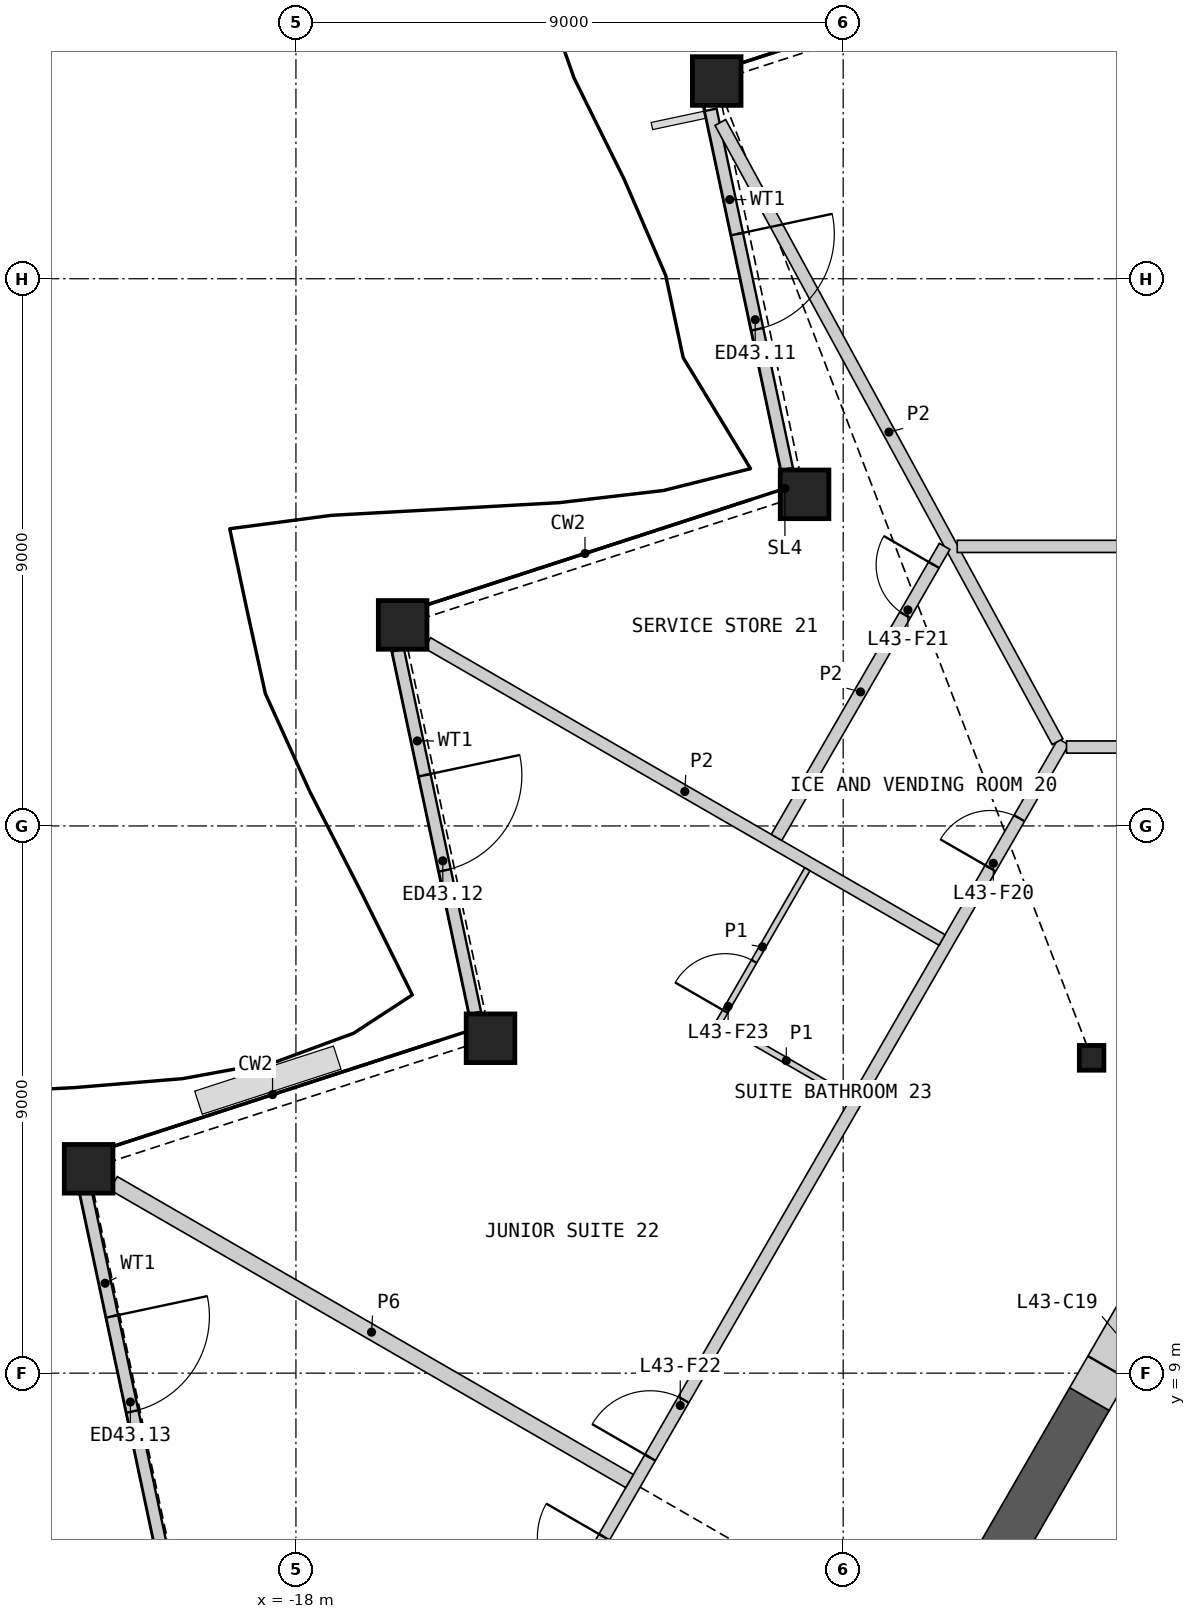
"""IFC4 building model, lengths in metres.
Left out: names, types, materials, properties, quantities, classifications, styles, units other than length and angle.
Written with IfcOpenShell. Run it as: python <this file> out.ifc"""

import sys

from ifc_helpers import new_model, si_unit, direction, frame, frame_2d, origin, origin_2d, place, context, subcontext, project, spatial, polyline, rectangle, hollow_rectangle, i_section, outline, extrude, element, fill, save


model = new_model("IFC4")
c1 = context("Model", 3, precision=1e-05, world=origin(), true_north=direction((0.0, 1.0)))
c2 = subcontext(c1, "Body", "Model", "MODEL_VIEW")
j1 = project(units=[si_unit("LENGTHUNIT", "METRE"), si_unit("PLANEANGLEUNIT", "RADIAN")], contexts=[c1])
p1 = place(None, origin())
s1 = spatial("IfcSite", under=j1, at=p1, CompositionType="ELEMENT")
p2 = place(p1, origin())
s2 = spatial("IfcBuilding", under=s1, at=p2, CompositionType="ELEMENT")
p3 = place(p2, frame((0.0, 0.0, 198.0)))
s3 = spatial("IfcBuildingStorey", under=s2, at=p3, CompositionType="ELEMENT", Elevation=198.0)
for number, where, z_axis, x_axis in (
    (1, (-11.08, 30.252, 0.0), (0.0, 0.0, 1.0), (1.0, 0.0, 0.0)),
    (2, (-9.635, 23.454, 0.0), (0.0, 0.0, 1.0), (1.0, 0.0, 0.0)),
    (3, (-16.245, 21.306, 0.0), (0.0, 0.0, 1.0), (1.0, 0.0, 0.0)),
    (4, (-14.8, 14.508, 0.0), (0.0, 0.0, 1.0), (1.0, 0.0, 0.0)),
    (5, (-21.409, 12.361, 0.0), (0.0, 0.0, 1.0), (1.0, 0.0, 0.0)),
):
    element("IfcColumn", number, at=place(p3, frame(where, z_axis=z_axis, x_axis=x_axis)), inside=s3, PredefinedType="COLUMN", context=c2, shape_type="SweptSolid", body=[
        extrude(hollow_rectangle(XDim=0.8, YDim=0.8, WallThickness=0.05, at=origin_2d()), origin(), (0.0, 0.0, 1.0), 3.6),
    ])
p4 = place(p3, frame((-4.914, 14.186, 0.0), z_axis=(0.0, 0.0, 1.0), x_axis=(1.0, 0.0, 0.0)))
e6 = element("IfcColumn", 6, at=p4, inside=s3, PredefinedType="COLUMN", context=c2, shape_type="SweptSolid", body=[
    extrude(i_section(OverallWidth=0.404, OverallDepth=0.407, WebThickness=0.027, FlangeThickness=0.044, at=origin_2d()), origin(), (0.0, 0.0, 1.0), 3.6),
])
p5 = place(p3, frame((-11.18, 29.778, 0.0), z_axis=(0.0, 0.0, 1.0), x_axis=(0.207894531291, -0.978151247946, 0.0)))
e7 = element("IfcWall", 7, at=p5, inside=s3, PredefinedType="SOLIDWALL", context=c2, shape_type="SweptSolid", body=[
    extrude(rectangle(XDim=6.04, YDim=0.2, at=frame_2d((3.02, 0.0))), origin(), (0.0, 0.0, 1.0), 2.701),
])
p6 = place(p5, frame((2.089, 0.0, 0.0)))
e8 = element("IfcOpeningElement", 8, at=p6, cuts=e7, PredefinedType="OPENING", context=c2, shape_type="SweptSolid", body=[
    extrude(rectangle(XDim=1.6, YDim=2.4, at=frame_2d((0.8, 1.2))), frame((0.0, 0.11, 0.0), z_axis=(0.0, -1.0, 0.0), x_axis=(1.0, 0.0, 0.0)), (0.0, 0.0, 1.0), 0.22),
])
p7 = place(p3, frame((-16.321, 20.89, 0.0), z_axis=(0.0, 0.0, 1.0), x_axis=(0.207912864597, -0.978147351238, 0.0)))
e9 = element("IfcWall", 9, at=p7, inside=s3, PredefinedType="SOLIDWALL", context=c2, shape_type="SweptSolid", body=[
    extrude(rectangle(XDim=6.098, YDim=0.2, at=frame_2d((3.049, 0.0))), origin(), (0.0, 0.0, 1.0), 2.701),
])
p8 = place(p7, frame((2.101, 0.0, 0.0)))
e10 = element("IfcOpeningElement", 10, at=p8, cuts=e9, PredefinedType="OPENING", context=c2, shape_type="SweptSolid", body=[
    extrude(rectangle(XDim=1.6, YDim=2.4, at=frame_2d((0.8, 1.2))), frame((0.0, 0.11, 0.0), z_axis=(0.0, -1.0, 0.0), x_axis=(1.0, 0.0, 0.0)), (0.0, 0.0, 1.0), 0.22),
])
p9 = place(p3, frame((-21.457, 11.978, 0.0), z_axis=(0.0, 0.0, 1.0), x_axis=(0.207930174887, -0.978143671641, 0.0)))
e11 = element("IfcWall", 11, at=p9, inside=s3, PredefinedType="SOLIDWALL", context=c2, shape_type="SweptSolid", body=[
    extrude(rectangle(XDim=6.133, YDim=0.2, at=frame_2d((3.066, 0.0))), origin(), (0.0, 0.0, 1.0), 2.701),
])
p10 = place(p9, frame((2.089, 0.0, 0.0)))
e12 = element("IfcOpeningElement", 12, at=p10, cuts=e11, PredefinedType="OPENING", context=c2, shape_type="SweptSolid", body=[
    extrude(rectangle(XDim=1.6, YDim=2.4, at=frame_2d((0.8, 1.2))), frame((0.0, 0.11, 0.0), z_axis=(0.0, -1.0, 0.0), x_axis=(1.0, 0.0, 0.0)), (0.0, 0.0, 1.0), 0.22),
])
p11 = place(p3, origin())
e13 = element("IfcWall", 13, at=p11, inside=s3, PredefinedType="SHEAR", context=c2, shape_type="SweptSolid", body=[
    extrude(outline(polyline([(-4.96, 0.208), (-7.131, 1.461), (-3.731, 7.35), (-1.561, 6.097), (-1.66, 5.924), (-3.652, 7.074), (-4.652, 5.342), (-2.66, 4.192), (-2.76, 4.019), (-4.752, 5.169), (-5.752, 3.437), (-3.76, 2.287), (-3.861, 2.113), (-5.852, 3.263), (-6.852, 1.531), (-4.861, 0.381), (-4.96, 0.208)])), origin(), (0.0, 0.0, 1.0), 3.25),
])
p12 = place(p3, frame((-4.95, 8.574, 0.0), z_axis=(0.0, 0.0, 1.0), x_axis=(-0.499987463267, -0.866032641749, 0.0)))
e14 = element("IfcWall", 14, at=p12, inside=s3, PredefinedType="SHEAR", context=c2, shape_type="SweptSolid", body=[
    extrude(rectangle(XDim=7.151, YDim=0.75, at=frame_2d((3.575, 0.0))), origin(), (0.0, 0.0, 1.0), 3.25),
])
p13 = place(p3, frame((-3.85, 10.479, 0.0), z_axis=(0.0, 0.0, 1.0), x_axis=(-0.499946605688, -0.86605622881, 0.0)))
e15 = element("IfcWall", 15, at=p13, inside=s3, PredefinedType="SHEAR", context=c2, shape_type="SweptSolid", body=[
    extrude(rectangle(XDim=2.2, YDim=0.75, at=frame_2d((1.1, 0.0))), origin(), (0.0, 0.0, 1.0), 3.25),
])
p14 = place(p13, frame((0.6, 0.0, 0.0)))
e16 = element("IfcOpeningElement", 16, at=p14, cuts=e15, PredefinedType="OPENING", context=c2, shape_type="SweptSolid", body=[
    extrude(rectangle(XDim=1.0, YDim=2.1, at=frame_2d((0.5, 1.05))), frame((0.0, 0.385, 0.0), z_axis=(0.0, -1.0, 0.0), x_axis=(1.0, 0.0, 0.0)), (0.0, 0.0, 1.0), 0.77),
])
p15 = place(p3, frame((-19.476, -5.035, 0.0), z_axis=(0.0, 0.0, 1.0), x_axis=(0.500000757641, 0.86602496636, 0.0)))
e17 = element("IfcWall", 17, at=p15, inside=s3, PredefinedType="PARTITIONING", context=c2, shape_type="SweptSolid", body=[
    extrude(rectangle(XDim=28.198, YDim=0.2, at=frame_2d((14.099, 0.0))), origin(), (0.0, 0.0, 1.0), 3.25),
])
p16 = place(p15, frame((25.796, 0.0, 0.0)))
e18 = element("IfcOpeningElement", 18, at=p16, cuts=e17, PredefinedType="OPENING", context=c2, shape_type="SweptSolid", body=[
    extrude(rectangle(XDim=0.95, YDim=2.1, at=frame_2d((0.475, 1.05))), frame((0.0, 0.11, 0.0), z_axis=(0.0, -1.0, 0.0), x_axis=(1.0, 0.0, 0.0)), (0.0, 0.0, 1.0), 0.22),
])
p17 = place(p15, frame((14.603, 0.0, 0.0)))
e19 = element("IfcOpeningElement", 19, at=p17, cuts=e17, PredefinedType="OPENING", context=c2, shape_type="SweptSolid", body=[
    extrude(rectangle(XDim=1.1, YDim=2.1, at=frame_2d((0.55, 1.05))), frame((0.0, 0.11, 0.0), z_axis=(0.0, -1.0, 0.0), x_axis=(1.0, 0.0, 0.0)), (0.0, 0.0, 1.0), 0.22),
])
p18 = place(p15, frame((11.993, 0.0, 0.0)))
e20 = element("IfcOpeningElement", 20, at=p18, cuts=e17, PredefinedType="OPENING", context=c2, shape_type="SweptSolid", body=[
    extrude(rectangle(XDim=1.1, YDim=2.1, at=frame_2d((0.55, 1.05))), frame((0.0, 0.11, 0.0), z_axis=(0.0, -1.0, 0.0), x_axis=(1.0, 0.0, 0.0)), (0.0, 0.0, 1.0), 0.22),
])
p19 = place(p15, frame((1.452, 0.0, 0.0)))
e21 = element("IfcOpeningElement", 21, at=p19, cuts=e17, PredefinedType="OPENING", context=c2, shape_type="SweptSolid", body=[
    extrude(rectangle(XDim=0.95, YDim=2.1, at=frame_2d((0.475, 1.05))), frame((0.0, 0.11, 0.0), z_axis=(0.0, -1.0, 0.0), x_axis=(1.0, 0.0, 0.0)), (0.0, 0.0, 1.0), 0.22),
])
p20 = place(p3, frame((-21.0, 12.124, 0.0), z_axis=(0.0, 0.0, 1.0), x_axis=(0.866032905446, -0.499987006516, 0.0)))
e22 = element("IfcWall", 22, at=p20, inside=s3, PredefinedType="PARTITIONING", context=c2, shape_type="SweptSolid", body=[
    extrude(rectangle(XDim=9.799, YDim=0.25, at=frame_2d((4.899, 0.0))), origin(), (0.0, 0.0, 1.0), 2.404),
])
p21 = place(p3, frame((-5.327, 19.298, 0.0), z_axis=(0.0, 0.0, 1.0), x_axis=(1.0, 0.0, 0.0)))
e23 = element("IfcWall", 23, at=p21, inside=s3, PredefinedType="PARTITIONING", context=c2, shape_type="SweptSolid", body=[
    extrude(rectangle(XDim=3.002, YDim=0.2, at=frame_2d((1.501, 0.0))), origin(), (0.0, 0.0, 1.0), 3.25),
])
p22 = place(p3, frame((-11.021, 29.57, 0.0), z_axis=(0.0, 0.0, 1.0), x_axis=(0.478233946204, -0.878232482147, 0.0)))
e24 = element("IfcWall", 24, at=p22, inside=s3, PredefinedType="PARTITIONING", context=c2, shape_type="SweptSolid", body=[
    extrude(rectangle(XDim=11.596, YDim=0.2, at=frame_2d((5.798, 0.0))), origin(), (0.0, 0.0, 1.0), 2.404),
])
p23 = place(p3, frame((-15.835, 21.009, 0.0), z_axis=(0.0, 0.0, 1.0), x_axis=(0.866024525919, -0.500001520505, 0.0)))
e25 = element("IfcWall", 25, at=p23, inside=s3, PredefinedType="PARTITIONING", context=c2, shape_type="SweptSolid", body=[
    extrude(rectangle(XDim=9.769, YDim=0.2, at=frame_2d((4.885, 0.0))), origin(), (0.0, 0.0, 1.0), 2.404),
])
p24 = place(p3, frame((-7.124, 22.598, 0.0), z_axis=(0.0, 0.0, 1.0), x_axis=(1.0, 0.0, 0.0)))
e26 = element("IfcWall", 26, at=p24, inside=s3, PredefinedType="PARTITIONING", context=c2, shape_type="SweptSolid", body=[
    extrude(rectangle(XDim=6.911, YDim=0.2, at=frame_2d((3.455, 0.0))), origin(), (0.0, 0.0, 1.0), 2.404),
])
p25 = place(p24, frame((4.801, 0.0, 0.0)))
e27 = element("IfcOpeningElement", 27, at=p25, cuts=e26, PredefinedType="OPENING", context=c2, shape_type="SweptSolid", body=[
    extrude(rectangle(XDim=0.95, YDim=2.1, at=frame_2d((0.475, 1.05))), frame((0.0, 0.11, 0.0), z_axis=(0.0, -1.0, 0.0), x_axis=(1.0, 0.0, 0.0)), (0.0, 0.0, 1.0), 0.22),
])
p26 = place(p3, frame((-10.096, 17.811, 0.0), z_axis=(0.0, 0.0, 1.0), x_axis=(0.500015590807, 0.866016402241, 0.0)))
e28 = element("IfcWall", 28, at=p26, inside=s3, PredefinedType="PARTITIONING", context=c2, shape_type="SweptSolid", body=[
    extrude(rectangle(XDim=5.527, YDim=0.2, at=frame_2d((2.764, 0.0))), origin(), (0.0, 0.0, 1.0), 2.404),
])
p27 = place(p26, frame((4.225, 0.0, 0.0)))
e29 = element("IfcOpeningElement", 29, at=p27, cuts=e28, PredefinedType="OPENING", context=c2, shape_type="SweptSolid", body=[
    extrude(rectangle(XDim=0.95, YDim=2.1, at=frame_2d((0.475, 1.05))), frame((0.0, 0.11, 0.0), z_axis=(0.0, -1.0, 0.0), x_axis=(1.0, 0.0, 0.0)), (0.0, 0.0, 1.0), 0.22),
])
p28 = place(p3, frame((-11.065, 14.733, 0.0), z_axis=(0.0, 0.0, 1.0), x_axis=(0.500037662692, 0.866003658127, 0.0)))
e30 = element("IfcWall", 30, at=p28, inside=s3, PredefinedType="PARTITIONING", context=c2, shape_type="SweptSolid", body=[
    extrude(rectangle(XDim=2.95, YDim=0.1, at=frame_2d((1.475, 0.0))), origin(), (0.0, 0.0, 1.0), 2.404),
])
p29 = place(p28, frame((0.25, 0.0, 0.0)))
e31 = element("IfcOpeningElement", 31, at=p29, cuts=e30, PredefinedType="OPENING", context=c2, shape_type="SweptSolid", body=[
    extrude(rectangle(XDim=0.95, YDim=2.1, at=frame_2d((0.475, 1.05))), frame((0.0, 0.06, 0.0), z_axis=(0.0, -1.0, 0.0), x_axis=(1.0, 0.0, 0.0)), (0.0, 0.0, 1.0), 0.12),
])
p30 = place(p3, frame((-10.996, 14.752, 0.0), z_axis=(0.0, 0.0, 1.0), x_axis=(0.866014668023, -0.500018594424, 0.0)))
e32 = element("IfcWall", 32, at=p30, inside=s3, PredefinedType="PARTITIONING", context=c2, shape_type="SweptSolid", body=[
    extrude(rectangle(XDim=2.45, YDim=0.1, at=frame_2d((1.225, 0.0))), origin(), (0.0, 0.0, 1.0), 2.404),
])
p31 = place(p6, origin())
e33 = element("IfcDoor", 33, at=p31, inside=s3, OperationType="DOUBLE_DOOR_SINGLE_SWING", PredefinedType="DOOR", context=c2, shape_type="SweptSolid", body=[
    extrude(rectangle(XDim=1.6, YDim=2.4, at=frame_2d((0.8, 1.2))), frame((0.0, 0.025, 0.0), z_axis=(0.0, -1.0, 0.0), x_axis=(1.0, 0.0, 0.0)), (0.0, 0.0, 1.0), 0.05),
])
fill(e8, e33)
p32 = place(p8, origin())
e34 = element("IfcDoor", 34, at=p32, inside=s3, OperationType="DOUBLE_DOOR_SINGLE_SWING", PredefinedType="DOOR", context=c2, shape_type="SweptSolid", body=[
    extrude(rectangle(XDim=1.6, YDim=2.4, at=frame_2d((0.8, 1.2))), frame((0.0, 0.025, 0.0), z_axis=(0.0, -1.0, 0.0), x_axis=(1.0, 0.0, 0.0)), (0.0, 0.0, 1.0), 0.05),
])
fill(e10, e34)
p33 = place(p10, origin())
e35 = element("IfcDoor", 35, at=p33, inside=s3, OperationType="DOUBLE_DOOR_SINGLE_SWING", PredefinedType="DOOR", context=c2, shape_type="SweptSolid", body=[
    extrude(rectangle(XDim=1.6, YDim=2.4, at=frame_2d((0.8, 1.2))), frame((0.0, 0.025, 0.0), z_axis=(0.0, -1.0, 0.0), x_axis=(1.0, 0.0, 0.0)), (0.0, 0.0, 1.0), 0.05),
])
fill(e12, e35)
p34 = place(p14, origin())
e36 = element("IfcDoor", 36, at=p34, inside=s3, OperationType="SINGLE_SWING_LEFT", PredefinedType="DOOR", context=c2, shape_type="SweptSolid", body=[
    extrude(rectangle(XDim=1.0, YDim=2.1, at=frame_2d((0.5, 1.05))), frame((0.0, 0.13, 0.0), z_axis=(0.0, -1.0, 0.0), x_axis=(1.0, 0.0, 0.0)), (0.0, 0.0, 1.0), 0.05),
])
fill(e16, e36)
p35 = place(p16, origin())
e37 = element("IfcDoor", 37, at=p35, inside=s3, OperationType="SINGLE_SWING_LEFT", PredefinedType="DOOR", context=c2, shape_type="SweptSolid", body=[
    extrude(rectangle(XDim=0.95, YDim=2.1, at=frame_2d((0.475, 1.05))), frame((0.0, 0.025, 0.0), z_axis=(0.0, -1.0, 0.0), x_axis=(1.0, 0.0, 0.0)), (0.0, 0.0, 1.0), 0.05),
])
fill(e18, e37)
p36 = place(p27, origin())
e38 = element("IfcDoor", 38, at=p36, inside=s3, OperationType="SINGLE_SWING_RIGHT", PredefinedType="DOOR", context=c2, shape_type="SweptSolid", body=[
    extrude(rectangle(XDim=0.95, YDim=2.1, at=frame_2d((0.475, 1.05))), frame((0.0, 0.025, 0.0), z_axis=(0.0, -1.0, 0.0), x_axis=(1.0, 0.0, 0.0)), (0.0, 0.0, 1.0), 0.05),
])
fill(e29, e38)
p37 = place(p17, origin())
e39 = element("IfcDoor", 39, at=p37, inside=s3, OperationType="SINGLE_SWING_LEFT", PredefinedType="DOOR", context=c2, shape_type="SweptSolid", body=[
    extrude(rectangle(XDim=1.1, YDim=2.1, at=frame_2d((0.55, 1.05))), frame((0.0, 0.025, 0.0), z_axis=(0.0, -1.0, 0.0), x_axis=(1.0, 0.0, 0.0)), (0.0, 0.0, 1.0), 0.05),
])
fill(e19, e39)
p38 = place(p29, origin())
e40 = element("IfcDoor", 40, at=p38, inside=s3, OperationType="SINGLE_SWING_LEFT", PredefinedType="DOOR", context=c2, shape_type="SweptSolid", body=[
    extrude(rectangle(XDim=0.95, YDim=2.1, at=frame_2d((0.475, 1.05))), frame((0.0, 0.025, 0.0), z_axis=(0.0, -1.0, 0.0), x_axis=(1.0, 0.0, 0.0)), (0.0, 0.0, 1.0), 0.05),
])
fill(e31, e40)
p39 = place(p18, origin())
e41 = element("IfcDoor", 41, at=p39, inside=s3, OperationType="SINGLE_SWING_RIGHT", PredefinedType="DOOR", context=c2, shape_type="SweptSolid", body=[
    extrude(rectangle(XDim=1.1, YDim=2.1, at=frame_2d((0.55, 1.05))), frame((0.0, 0.025, 0.0), z_axis=(0.0, -1.0, 0.0), x_axis=(1.0, 0.0, 0.0)), (0.0, 0.0, 1.0), 0.05),
])
fill(e20, e41)
save(model, sys.argv[1])
